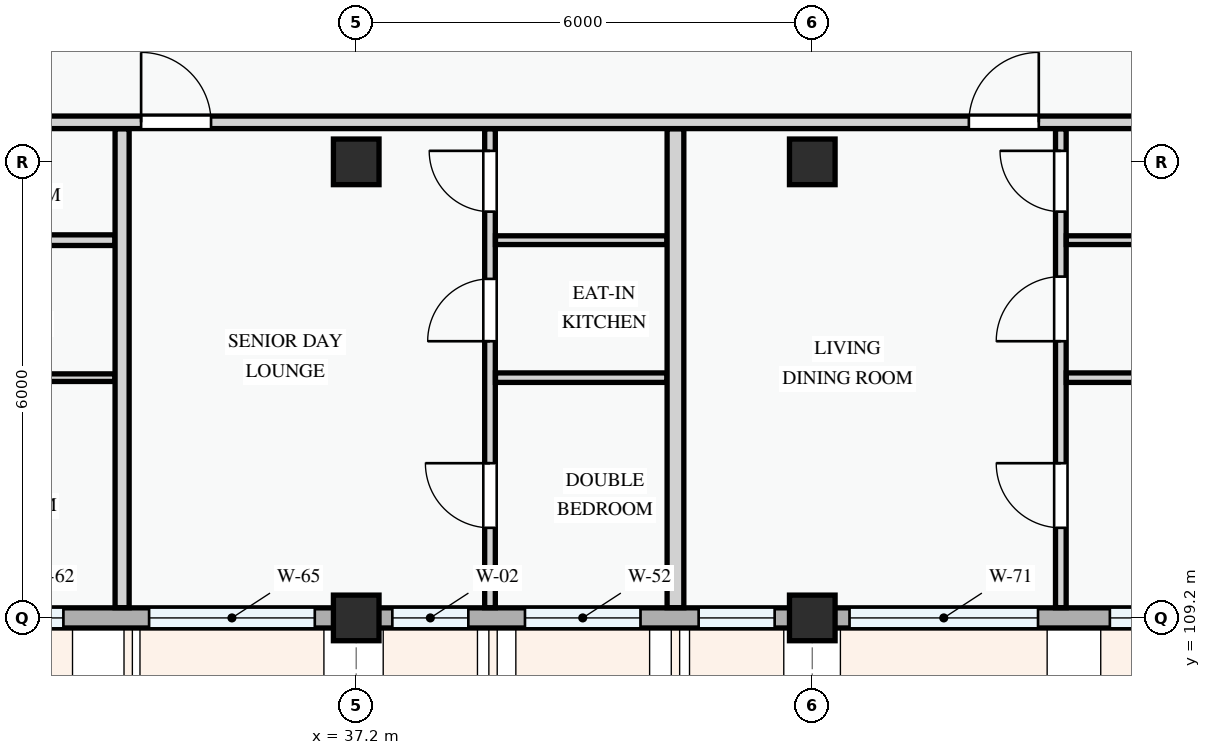
"""IFC4 building model, lengths in metres.
Left out: names, types, materials, properties, quantities, classifications, styles, units other than length and angle.
Written with IfcOpenShell. Run it as: python <this file> out.ifc"""

import sys

from ifc_helpers import new_model, si_unit, direction, frame, frame_2d, origin, origin_2d, place, context, subcontext, project, spatial, rectangle, extrude, element, fill, save


model = new_model("IFC4")
c1 = context("Model", 3, precision=1e-05, world=origin(), true_north=direction((0.0, 1.0)))
c2 = subcontext(c1, "Body", "Model", "MODEL_VIEW")
j1 = project(units=[si_unit("LENGTHUNIT", "METRE"), si_unit("PLANEANGLEUNIT", "RADIAN")], contexts=[c1])
p1 = place(None, origin())
s1 = spatial("IfcSite", under=j1, at=p1, CompositionType="ELEMENT")
p2 = place(p1, origin())
s2 = spatial("IfcBuilding", under=s1, at=p2, CompositionType="ELEMENT")
p3 = place(p2, frame((0.0, 0.0, 34.5)))
s3 = spatial("IfcBuildingStorey", under=s2, at=p3, CompositionType="ELEMENT", Elevation=34.5)
for number, where, z_axis, x_axis in (
    (1, (37.2, 109.2, 0.0), (0.0, 0.0, 1.0), (1.0, 0.0, 0.0)),
    (2, (37.2, 115.2, 0.0), (0.0, 0.0, 1.0), (1.0, 0.0, 0.0)),
    (3, (43.2, 109.2, 0.0), (0.0, 0.0, 1.0), (1.0, 0.0, 0.0)),
    (4, (43.2, 115.2, 0.0), (0.0, 0.0, 1.0), (1.0, 0.0, 0.0)),
):
    element("IfcColumn", number, at=place(p3, frame(where, z_axis=z_axis, x_axis=x_axis)), inside=s3, PredefinedType="COLUMN", context=c2, shape_type="SweptSolid", body=[
        extrude(rectangle(XDim=0.6, YDim=0.6, at=origin_2d()), origin(), (0.0, 0.0, 1.0), 3.3),
    ])
p4 = place(p3, frame((28.8, 109.2, 0.0), z_axis=(0.0, 0.0, 1.0), x_axis=(1.0, 0.0, 0.0)))
e5 = element("IfcWall", 5, at=p4, inside=s3, PredefinedType="STANDARD", context=c2, shape_type="SweptSolid", body=[
    extrude(rectangle(XDim=8.4, YDim=0.265, at=frame_2d((4.2, 0.0))), origin(), (0.0, 0.0, 1.0), 2.375),
])
p5 = place(p4, frame((0.512, 0.0, 0.78)))
e6 = element("IfcOpeningElement", 6, at=p5, cuts=e5, PredefinedType="OPENING", context=c2, shape_type="SweptSolid", body=[
    extrude(rectangle(XDim=0.9, YDim=1.2, at=frame_2d((0.45, 0.6))), frame((0.0, 0.143, 0.0), z_axis=(0.0, -1.0, 0.0), x_axis=(1.0, 0.0, 0.0)), (0.0, 0.0, 1.0), 0.285),
])
p6 = place(p4, frame((2.508, 0.0, 0.78)))
e7 = element("IfcOpeningElement", 7, at=p6, cuts=e5, PredefinedType="OPENING", context=c2, shape_type="SweptSolid", body=[
    extrude(rectangle(XDim=2.04, YDim=1.46, at=frame_2d((1.02, 0.73))), frame((0.0, 0.143, 0.0), z_axis=(0.0, -1.0, 0.0), x_axis=(1.0, 0.0, 0.0)), (0.0, 0.0, 1.0), 0.285),
])
p7 = place(p4, frame((5.675, 0.0, 0.78)))
e8 = element("IfcOpeningElement", 8, at=p7, cuts=e5, PredefinedType="OPENING", context=c2, shape_type="SweptSolid", body=[
    extrude(rectangle(XDim=2.18, YDim=1.48, at=frame_2d((1.09, 0.74))), frame((0.0, 0.143, 0.0), z_axis=(0.0, -1.0, 0.0), x_axis=(1.0, 0.0, 0.0)), (0.0, 0.0, 1.0), 0.285),
])
p8 = place(p3, frame((37.2, 109.2, 0.0), z_axis=(0.0, 0.0, 1.0), x_axis=(1.0, 0.0, 0.0)))
e9 = element("IfcWall", 9, at=p8, inside=s3, PredefinedType="STANDARD", context=c2, shape_type="SweptSolid", body=[
    extrude(rectangle(XDim=6.0, YDim=0.265, at=frame_2d((3.0, 0.0))), origin(), (0.0, 0.0, 1.0), 2.525),
])
p9 = place(p8, frame((0.475, 0.0, 0.78)))
e10 = element("IfcOpeningElement", 10, at=p9, cuts=e9, PredefinedType="OPENING", context=c2, shape_type="SweptSolid", body=[
    extrude(rectangle(XDim=1.0, YDim=1.25, at=frame_2d((0.5, 0.625))), frame((0.0, 0.143, 0.0), z_axis=(0.0, -1.0, 0.0), x_axis=(1.0, 0.0, 0.0)), (0.0, 0.0, 1.0), 0.285),
])
p10 = place(p8, frame((2.22, 0.0, 0.78)))
e11 = element("IfcOpeningElement", 11, at=p10, cuts=e9, PredefinedType="OPENING", context=c2, shape_type="SweptSolid", body=[
    extrude(rectangle(XDim=1.52, YDim=1.42, at=frame_2d((0.76, 0.71))), frame((0.0, 0.143, 0.0), z_axis=(0.0, -1.0, 0.0), x_axis=(1.0, 0.0, 0.0)), (0.0, 0.0, 1.0), 0.285),
])
p11 = place(p8, frame((4.505, 0.0, 0.78)))
e12 = element("IfcOpeningElement", 12, at=p11, cuts=e9, PredefinedType="OPENING", context=c2, shape_type="SweptSolid", body=[
    extrude(rectangle(XDim=1.0, YDim=1.25, at=frame_2d((0.5, 0.625))), frame((0.0, 0.143, 0.0), z_axis=(0.0, -1.0, 0.0), x_axis=(1.0, 0.0, 0.0)), (0.0, 0.0, 1.0), 0.285),
])
p12 = place(p3, frame((43.2, 109.2, 0.0), z_axis=(0.0, 0.0, 1.0), x_axis=(1.0, 0.0, 0.0)))
e13 = element("IfcWall", 13, at=p12, inside=s3, PredefinedType="STANDARD", context=c2, shape_type="SweptSolid", body=[
    extrude(rectangle(XDim=8.4, YDim=0.265, at=frame_2d((4.2, 0.0))), origin(), (0.0, 0.0, 1.0), 2.375),
])
p13 = place(p12, frame((0.49, 0.0, 0.78)))
e14 = element("IfcOpeningElement", 14, at=p13, cuts=e13, PredefinedType="OPENING", context=c2, shape_type="SweptSolid", body=[
    extrude(rectangle(XDim=2.48, YDim=1.46, at=frame_2d((1.24, 0.73))), frame((0.0, 0.143, 0.0), z_axis=(0.0, -1.0, 0.0), x_axis=(1.0, 0.0, 0.0)), (0.0, 0.0, 1.0), 0.285),
])
p14 = place(p12, frame((3.915, 0.0, 0.78)))
e15 = element("IfcOpeningElement", 15, at=p14, cuts=e13, PredefinedType="OPENING", context=c2, shape_type="SweptSolid", body=[
    extrude(rectangle(XDim=1.25, YDim=1.45, at=frame_2d((0.625, 0.725))), frame((0.0, 0.143, 0.0), z_axis=(0.0, -1.0, 0.0), x_axis=(1.0, 0.0, 0.0)), (0.0, 0.0, 1.0), 0.285),
])
p15 = place(p12, frame((6.1, 0.0, 0.78)))
e16 = element("IfcOpeningElement", 16, at=p15, cuts=e13, PredefinedType="OPENING", context=c2, shape_type="SweptSolid", body=[
    extrude(rectangle(XDim=1.68, YDim=1.46, at=frame_2d((0.84, 0.73))), frame((0.0, 0.143, 0.0), z_axis=(0.0, -1.0, 0.0), x_axis=(1.0, 0.0, 0.0)), (0.0, 0.0, 1.0), 0.285),
])
p16 = place(p3, frame((30.594, 112.361, 0.0), z_axis=(0.0, 0.0, 1.0), x_axis=(1.0, 0.0, 0.0)))
e17 = element("IfcWall", 17, at=p16, inside=s3, PredefinedType="PARTITIONING", context=c2, shape_type="SweptSolid", body=[
    extrude(rectangle(XDim=3.431, YDim=0.1, at=frame_2d((1.715, 0.0))), origin(), (0.0, 0.0, 1.0), 3.0),
])
p17 = place(p3, frame((30.594, 114.17, 0.0), z_axis=(0.0, 0.0, 1.0), x_axis=(1.0, 0.0, 0.0)))
e18 = element("IfcWall", 18, at=p17, inside=s3, PredefinedType="PARTITIONING", context=c2, shape_type="SweptSolid", body=[
    extrude(rectangle(XDim=3.431, YDim=0.14, at=frame_2d((1.715, 0.0))), origin(), (0.0, 0.0, 1.0), 3.0),
])
p18 = place(p3, frame((38.96, 109.334, 0.0), z_axis=(0.0, 0.0, 1.0), x_axis=(0.0, 1.0, 0.0)))
e19 = element("IfcWall", 19, at=p18, inside=s3, PredefinedType="PARTITIONING", context=c2, shape_type="SweptSolid", body=[
    extrude(rectangle(XDim=6.301, YDim=0.14, at=frame_2d((3.15, 0.0))), origin(), (0.0, 0.0, 1.0), 3.0),
])
p19 = place(p18, frame((1.051, 0.0, 0.0)))
e20 = element("IfcOpeningElement", 20, at=p19, cuts=e19, PredefinedType="OPENING", context=c2, shape_type="SweptSolid", body=[
    extrude(rectangle(XDim=0.85, YDim=2.1, at=frame_2d((0.425, 1.05))), frame((0.0, 0.08, 0.0), z_axis=(0.0, -1.0, 0.0), x_axis=(1.0, 0.0, 0.0)), (0.0, 0.0, 1.0), 0.16),
])
p20 = place(p18, frame((3.506, 0.0, 0.0)))
e21 = element("IfcOpeningElement", 21, at=p20, cuts=e19, PredefinedType="OPENING", context=c2, shape_type="SweptSolid", body=[
    extrude(rectangle(XDim=0.82, YDim=2.08, at=frame_2d((0.41, 1.04))), frame((0.0, 0.08, 0.0), z_axis=(0.0, -1.0, 0.0), x_axis=(1.0, 0.0, 0.0)), (0.0, 0.0, 1.0), 0.16),
])
p21 = place(p18, frame((5.21, 0.0, 0.0)))
e22 = element("IfcOpeningElement", 22, at=p21, cuts=e19, PredefinedType="OPENING", context=c2, shape_type="SweptSolid", body=[
    extrude(rectangle(XDim=0.8, YDim=2.1, at=frame_2d((0.4, 1.05))), frame((0.0, 0.08, 0.0), z_axis=(0.0, -1.0, 0.0), x_axis=(1.0, 0.0, 0.0)), (0.0, 0.0, 1.0), 0.16),
])
p22 = place(p3, frame((39.032, 112.361, 0.0), z_axis=(0.0, 0.0, 1.0), x_axis=(1.0, 0.0, 0.0)))
e23 = element("IfcWall", 23, at=p22, inside=s3, PredefinedType="PARTITIONING", context=c2, shape_type="SweptSolid", body=[
    extrude(rectangle(XDim=2.256, YDim=0.125, at=frame_2d((1.128, 0.0))), origin(), (0.0, 0.0, 1.0), 3.0),
])
p23 = place(p3, frame((39.032, 114.17, 0.0), z_axis=(0.0, 0.0, 1.0), x_axis=(1.0, 0.0, 0.0)))
e24 = element("IfcWall", 24, at=p23, inside=s3, PredefinedType="PARTITIONING", context=c2, shape_type="SweptSolid", body=[
    extrude(rectangle(XDim=2.256, YDim=0.115, at=frame_2d((1.128, 0.0))), origin(), (0.0, 0.0, 1.0), 3.0),
])
p24 = place(p3, frame((34.12, 109.334, 0.0), z_axis=(0.0, 0.0, 1.0), x_axis=(0.0, 1.0, 0.0)))
e25 = element("IfcWall", 25, at=p24, inside=s3, PredefinedType="PARTITIONING", context=c2, shape_type="SweptSolid", body=[
    extrude(rectangle(XDim=6.301, YDim=0.185, at=frame_2d((3.15, 0.0))), origin(), (0.0, 0.0, 1.0), 3.0),
])
p25 = place(p3, frame((46.47, 109.334, 0.0), z_axis=(0.0, 0.0, 1.0), x_axis=(0.0, 1.0, 0.0)))
e26 = element("IfcWall", 26, at=p25, inside=s3, PredefinedType="PARTITIONING", context=c2, shape_type="SweptSolid", body=[
    extrude(rectangle(XDim=6.301, YDim=0.14, at=frame_2d((3.15, 0.0))), origin(), (0.0, 0.0, 1.0), 3.0),
])
p26 = place(p25, frame((1.051, 0.0, 0.0)))
e27 = element("IfcOpeningElement", 27, at=p26, cuts=e26, PredefinedType="OPENING", context=c2, shape_type="SweptSolid", body=[
    extrude(rectangle(XDim=0.85, YDim=2.1, at=frame_2d((0.425, 1.05))), frame((0.0, 0.08, 0.0), z_axis=(0.0, -1.0, 0.0), x_axis=(1.0, 0.0, 0.0)), (0.0, 0.0, 1.0), 0.16),
])
p27 = place(p25, frame((3.506, 0.0, 0.0)))
e28 = element("IfcOpeningElement", 28, at=p27, cuts=e26, PredefinedType="OPENING", context=c2, shape_type="SweptSolid", body=[
    extrude(rectangle(XDim=0.85, YDim=2.1, at=frame_2d((0.425, 1.05))), frame((0.0, 0.08, 0.0), z_axis=(0.0, -1.0, 0.0), x_axis=(1.0, 0.0, 0.0)), (0.0, 0.0, 1.0), 0.16),
])
p28 = place(p25, frame((5.21, 0.0, 0.0)))
e29 = element("IfcOpeningElement", 29, at=p28, cuts=e26, PredefinedType="OPENING", context=c2, shape_type="SweptSolid", body=[
    extrude(rectangle(XDim=0.8, YDim=2.1, at=frame_2d((0.4, 1.05))), frame((0.0, 0.08, 0.0), z_axis=(0.0, -1.0, 0.0), x_axis=(1.0, 0.0, 0.0)), (0.0, 0.0, 1.0), 0.16),
])
p29 = place(p3, frame((46.542, 112.361, 0.0), z_axis=(0.0, 0.0, 1.0), x_axis=(1.0, 0.0, 0.0)))
e30 = element("IfcWall", 30, at=p29, inside=s3, PredefinedType="PARTITIONING", context=c2, shape_type="SweptSolid", body=[
    extrude(rectangle(XDim=4.924, YDim=0.125, at=frame_2d((2.462, 0.0))), origin(), (0.0, 0.0, 1.0), 3.0),
])
p30 = place(p3, frame((46.542, 114.17, 0.0), z_axis=(0.0, 0.0, 1.0), x_axis=(1.0, 0.0, 0.0)))
e31 = element("IfcWall", 31, at=p30, inside=s3, PredefinedType="PARTITIONING", context=c2, shape_type="SweptSolid", body=[
    extrude(rectangle(XDim=4.924, YDim=0.115, at=frame_2d((2.462, 0.0))), origin(), (0.0, 0.0, 1.0), 3.0),
])
p31 = place(p3, frame((41.4, 109.334, 0.0), z_axis=(0.0, 0.0, 1.0), x_axis=(0.0, 1.0, 0.0)))
e32 = element("IfcWall", 32, at=p31, inside=s3, PredefinedType="PARTITIONING", context=c2, shape_type="SweptSolid", body=[
    extrude(rectangle(XDim=6.301, YDim=0.22, at=frame_2d((3.15, 0.0))), origin(), (0.0, 0.0, 1.0), 3.0),
])
p32 = place(p3, frame((25.15, 115.72, 0.0), z_axis=(0.0, 0.0, 1.0), x_axis=(1.0, 0.0, 0.0)))
e33 = element("IfcWall", 33, at=p32, inside=s3, PredefinedType="PARTITIONING", context=c2, shape_type="SweptSolid", body=[
    extrude(rectangle(XDim=26.316, YDim=0.165, at=frame_2d((13.158, 0.0))), origin(), (0.0, 0.0, 1.0), 3.0),
])
p33 = place(p32, frame((0.25, 0.0, 0.0)))
e34 = element("IfcOpeningElement", 34, at=p33, cuts=e33, PredefinedType="OPENING", context=c2, shape_type="SweptSolid", body=[
    extrude(rectangle(XDim=0.92, YDim=2.1, at=frame_2d((0.46, 1.05))), frame((0.0, 0.093, 0.0), z_axis=(0.0, -1.0, 0.0), x_axis=(1.0, 0.0, 0.0)), (0.0, 0.0, 1.0), 0.185),
])
p34 = place(p32, frame((9.22, 0.0, 0.0)))
e35 = element("IfcOpeningElement", 35, at=p34, cuts=e33, PredefinedType="OPENING", context=c2, shape_type="SweptSolid", body=[
    extrude(rectangle(XDim=0.92, YDim=2.1, at=frame_2d((0.46, 1.05))), frame((0.0, 0.093, 0.0), z_axis=(0.0, -1.0, 0.0), x_axis=(1.0, 0.0, 0.0)), (0.0, 0.0, 1.0), 0.185),
])
p35 = place(p32, frame((20.11, 0.0, 0.0)))
e36 = element("IfcOpeningElement", 36, at=p35, cuts=e33, PredefinedType="OPENING", context=c2, shape_type="SweptSolid", body=[
    extrude(rectangle(XDim=0.92, YDim=2.1, at=frame_2d((0.46, 1.05))), frame((0.0, 0.093, 0.0), z_axis=(0.0, -1.0, 0.0), x_axis=(1.0, 0.0, 0.0)), (0.0, 0.0, 1.0), 0.185),
])
p36 = place(p6, origin())
e37 = element("IfcWindow", 37, at=p36, inside=s3, PartitioningType="DOUBLE_PANEL_VERTICAL", PredefinedType="WINDOW", context=c2, shape_type="SweptSolid", body=[
    extrude(rectangle(XDim=2.04, YDim=1.46, at=frame_2d((1.02, 0.73))), frame((0.0, 0.03, 0.0), z_axis=(0.0, -1.0, 0.0), x_axis=(1.0, 0.0, 0.0)), (0.0, 0.0, 1.0), 0.06),
])
fill(e7, e37)
p37 = place(p7, origin())
e38 = element("IfcWindow", 38, at=p37, inside=s3, PartitioningType="DOUBLE_PANEL_VERTICAL", PredefinedType="WINDOW", context=c2, shape_type="SweptSolid", body=[
    extrude(rectangle(XDim=2.18, YDim=1.48, at=frame_2d((1.09, 0.74))), frame((0.0, 0.03, 0.0), z_axis=(0.0, -1.0, 0.0), x_axis=(1.0, 0.0, 0.0)), (0.0, 0.0, 1.0), 0.06),
])
fill(e8, e38)
p38 = place(p9, origin())
e39 = element("IfcWindow", 39, at=p38, inside=s3, PartitioningType="SINGLE_PANEL", PredefinedType="WINDOW", context=c2, shape_type="SweptSolid", body=[
    extrude(rectangle(XDim=1.0, YDim=1.25, at=frame_2d((0.5, 0.625))), frame((0.0, 0.03, 0.0), z_axis=(0.0, -1.0, 0.0), x_axis=(1.0, 0.0, 0.0)), (0.0, 0.0, 1.0), 0.06),
])
fill(e10, e39)
p39 = place(p10, origin())
e40 = element("IfcWindow", 40, at=p39, inside=s3, PartitioningType="SINGLE_PANEL", PredefinedType="WINDOW", context=c2, shape_type="SweptSolid", body=[
    extrude(rectangle(XDim=1.52, YDim=1.42, at=frame_2d((0.76, 0.71))), frame((0.0, 0.03, 0.0), z_axis=(0.0, -1.0, 0.0), x_axis=(1.0, 0.0, 0.0)), (0.0, 0.0, 1.0), 0.06),
])
fill(e11, e40)
p40 = place(p11, origin())
e41 = element("IfcWindow", 41, at=p40, inside=s3, PartitioningType="SINGLE_PANEL", PredefinedType="WINDOW", context=c2, shape_type="SweptSolid", body=[
    extrude(rectangle(XDim=1.0, YDim=1.25, at=frame_2d((0.5, 0.625))), frame((0.0, 0.03, 0.0), z_axis=(0.0, -1.0, 0.0), x_axis=(1.0, 0.0, 0.0)), (0.0, 0.0, 1.0), 0.06),
])
fill(e12, e41)
p41 = place(p13, origin())
e42 = element("IfcWindow", 42, at=p41, inside=s3, PartitioningType="DOUBLE_PANEL_VERTICAL", PredefinedType="WINDOW", context=c2, shape_type="SweptSolid", body=[
    extrude(rectangle(XDim=2.48, YDim=1.46, at=frame_2d((1.24, 0.73))), frame((0.0, 0.03, 0.0), z_axis=(0.0, -1.0, 0.0), x_axis=(1.0, 0.0, 0.0)), (0.0, 0.0, 1.0), 0.06),
])
fill(e14, e42)
p42 = place(p14, origin())
e43 = element("IfcWindow", 43, at=p42, inside=s3, PartitioningType="SINGLE_PANEL", PredefinedType="WINDOW", context=c2, shape_type="SweptSolid", body=[
    extrude(rectangle(XDim=1.25, YDim=1.45, at=frame_2d((0.625, 0.725))), frame((0.0, 0.03, 0.0), z_axis=(0.0, -1.0, 0.0), x_axis=(1.0, 0.0, 0.0)), (0.0, 0.0, 1.0), 0.06),
])
fill(e15, e43)
p43 = place(p19, origin())
e44 = element("IfcDoor", 44, at=p43, inside=s3, OperationType="SINGLE_SWING_RIGHT", PredefinedType="DOOR", context=c2, shape_type="SweptSolid", body=[
    extrude(rectangle(XDim=0.85, YDim=2.1, at=frame_2d((0.425, 1.05))), frame((0.0, 0.025, 0.0), z_axis=(0.0, -1.0, 0.0), x_axis=(1.0, 0.0, 0.0)), (0.0, 0.0, 1.0), 0.05),
])
fill(e20, e44)
p44 = place(p20, origin())
e45 = element("IfcDoor", 45, at=p44, inside=s3, OperationType="SINGLE_SWING_LEFT", PredefinedType="DOOR", context=c2, shape_type="SweptSolid", body=[
    extrude(rectangle(XDim=0.82, YDim=2.08, at=frame_2d((0.41, 1.04))), frame((0.0, 0.025, 0.0), z_axis=(0.0, -1.0, 0.0), x_axis=(1.0, 0.0, 0.0)), (0.0, 0.0, 1.0), 0.05),
])
fill(e21, e45)
p45 = place(p21, origin())
e46 = element("IfcDoor", 46, at=p45, inside=s3, OperationType="SINGLE_SWING_RIGHT", PredefinedType="DOOR", context=c2, shape_type="SweptSolid", body=[
    extrude(rectangle(XDim=0.8, YDim=2.1, at=frame_2d((0.4, 1.05))), frame((0.0, 0.025, 0.0), z_axis=(0.0, -1.0, 0.0), x_axis=(1.0, 0.0, 0.0)), (0.0, 0.0, 1.0), 0.05),
])
fill(e22, e46)
p46 = place(p26, origin())
e47 = element("IfcDoor", 47, at=p46, inside=s3, OperationType="SINGLE_SWING_RIGHT", PredefinedType="DOOR", context=c2, shape_type="SweptSolid", body=[
    extrude(rectangle(XDim=0.85, YDim=2.1, at=frame_2d((0.425, 1.05))), frame((0.0, 0.025, 0.0), z_axis=(0.0, -1.0, 0.0), x_axis=(1.0, 0.0, 0.0)), (0.0, 0.0, 1.0), 0.05),
])
fill(e27, e47)
p47 = place(p27, origin())
e48 = element("IfcDoor", 48, at=p47, inside=s3, OperationType="SINGLE_SWING_LEFT", PredefinedType="DOOR", context=c2, shape_type="SweptSolid", body=[
    extrude(rectangle(XDim=0.85, YDim=2.1, at=frame_2d((0.425, 1.05))), frame((0.0, 0.025, 0.0), z_axis=(0.0, -1.0, 0.0), x_axis=(1.0, 0.0, 0.0)), (0.0, 0.0, 1.0), 0.05),
])
fill(e28, e48)
p48 = place(p28, origin())
e49 = element("IfcDoor", 49, at=p48, inside=s3, OperationType="SINGLE_SWING_RIGHT", PredefinedType="DOOR", context=c2, shape_type="SweptSolid", body=[
    extrude(rectangle(XDim=0.8, YDim=2.1, at=frame_2d((0.4, 1.05))), frame((0.0, 0.025, 0.0), z_axis=(0.0, -1.0, 0.0), x_axis=(1.0, 0.0, 0.0)), (0.0, 0.0, 1.0), 0.05),
])
fill(e29, e49)
p49 = place(p34, origin())
e50 = element("IfcDoor", 50, at=p49, inside=s3, OperationType="SINGLE_SWING_LEFT", PredefinedType="DOOR", context=c2, shape_type="SweptSolid", body=[
    extrude(rectangle(XDim=0.92, YDim=2.1, at=frame_2d((0.46, 1.05))), frame((0.0, 0.025, 0.0), z_axis=(0.0, -1.0, 0.0), x_axis=(1.0, 0.0, 0.0)), (0.0, 0.0, 1.0), 0.05),
])
fill(e35, e50)
p50 = place(p35, origin())
e51 = element("IfcDoor", 51, at=p50, inside=s3, OperationType="SINGLE_SWING_RIGHT", PredefinedType="DOOR", context=c2, shape_type="SweptSolid", body=[
    extrude(rectangle(XDim=0.92, YDim=2.1, at=frame_2d((0.46, 1.05))), frame((0.0, 0.025, 0.0), z_axis=(0.0, -1.0, 0.0), x_axis=(1.0, 0.0, 0.0)), (0.0, 0.0, 1.0), 0.05),
])
fill(e36, e51)
save(model, sys.argv[1])
